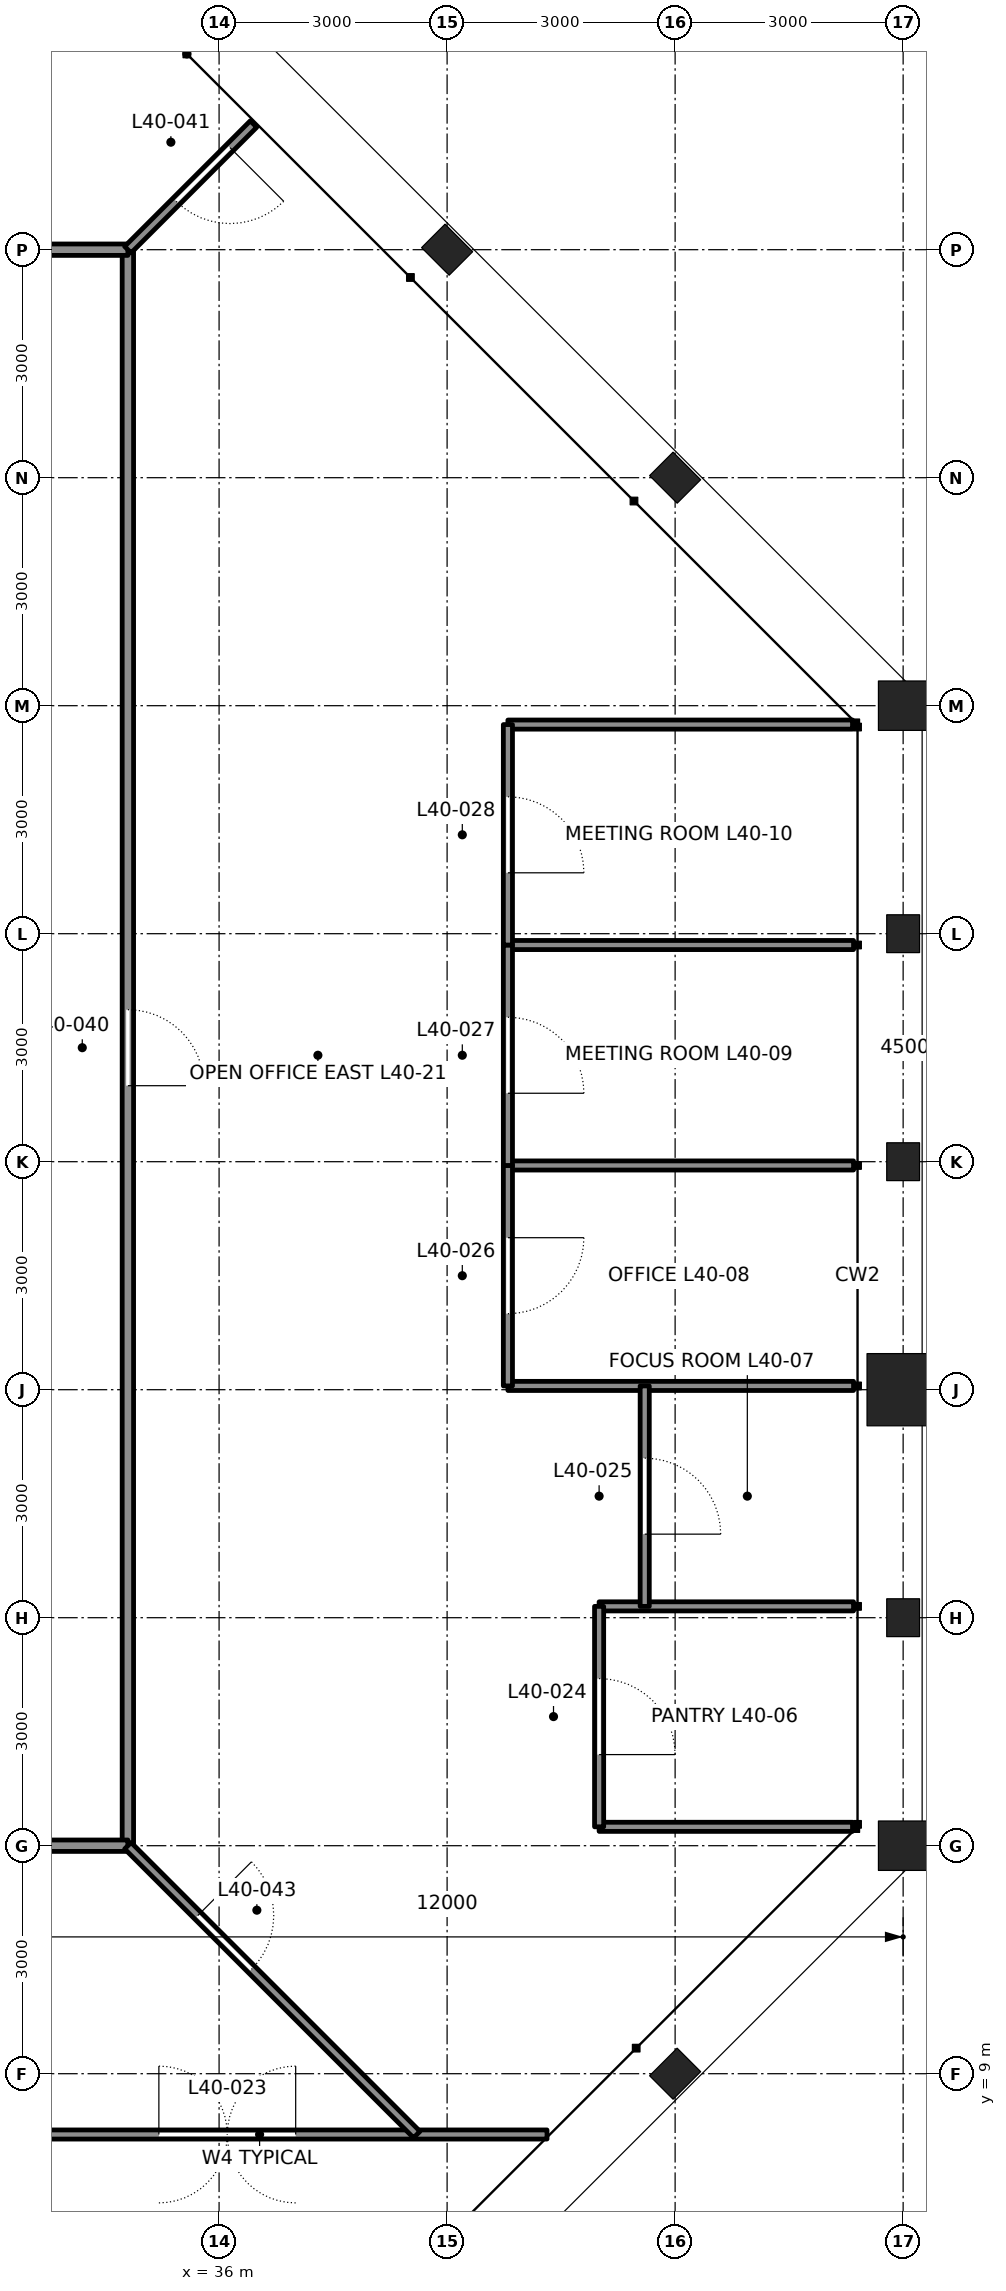
"""IFC4 building model, lengths in metres.
Left out: names, types, materials, properties, quantities, classifications, styles, units other than length and angle.
Written with IfcOpenShell. Run it as: python <this file> out.ifc"""

import sys

from ifc_helpers import new_model, si_unit, direction, frame, frame_2d, origin, origin_2d, place, context, subcontext, project, spatial, rectangle, hollow_rectangle, i_section, extrude, element, fill, save


model = new_model("IFC4")
c1 = context("Model", 3, precision=1e-05, world=origin(), true_north=direction((0.0, 1.0)))
c2 = subcontext(c1, "Body", "Model", "MODEL_VIEW")
j1 = project(units=[si_unit("LENGTHUNIT", "METRE"), si_unit("PLANEANGLEUNIT", "RADIAN")], contexts=[c1])
p1 = place(None, origin())
s1 = spatial("IfcSite", under=j1, at=p1, CompositionType="ELEMENT")
p2 = place(p1, origin())
s2 = spatial("IfcBuilding", under=s1, at=p2, CompositionType="ELEMENT")
p3 = place(p2, frame((0.0, 0.0, 184.5)))
s3 = spatial("IfcBuildingStorey", under=s2, at=p3, CompositionType="ELEMENT", Elevation=184.5)
p4 = place(p3, frame((42.0, 9.0, 0.0), z_axis=(0.0, 0.0, 1.0), x_axis=(0.707106781187, -0.707106781187, 0.0)))
e1 = element("IfcColumn", 1, at=p4, inside=s3, PredefinedType="COLUMN", context=c2, shape_type="SweptSolid", body=[
    extrude(i_section(OverallWidth=0.437, OverallDepth=0.513, WebThickness=0.061, FlangeThickness=0.097, at=origin_2d()), origin(), (0.0, 0.0, 1.0), 4.2),
])
p5 = place(p3, frame((45.0, 12.0, 0.0), z_axis=(0.0, 0.0, 1.0), x_axis=(1.0, 0.0, 0.0)))
e2 = element("IfcColumn", 2, at=p5, inside=s3, PredefinedType="COLUMN", context=c2, shape_type="SweptSolid", body=[
    extrude(hollow_rectangle(XDim=0.65, YDim=0.65, WallThickness=0.065, at=origin_2d()), origin(), (0.0, 0.0, 1.0), 4.2),
])
p6 = place(p3, frame((45.0, 15.0, 0.0), z_axis=(0.0, 0.0, 1.0), x_axis=(1.0, 0.0, 0.0)))
e3 = element("IfcColumn", 3, at=p6, inside=s3, PredefinedType="COLUMN", context=c2, shape_type="SweptSolid", body=[
    extrude(i_section(OverallWidth=0.432, OverallDepth=0.498, WebThickness=0.056, FlangeThickness=0.089, at=origin_2d()), origin(), (0.0, 0.0, 1.0), 4.2),
])
p7 = place(p3, frame((45.0, 18.0, 0.0), z_axis=(0.0, 0.0, 1.0), x_axis=(1.0, 0.0, 0.0)))
e4 = element("IfcColumn", 4, at=p7, inside=s3, PredefinedType="COLUMN", context=c2, shape_type="SweptSolid", body=[
    extrude(hollow_rectangle(XDim=0.95, YDim=0.95, WallThickness=0.11, at=origin_2d()), origin(), (0.0, 0.0, 1.0), 4.2),
])
for number, where, z_axis, x_axis in (
    (5, (45.0, 21.0, 0.0), (0.0, 0.0, 1.0), (1.0, 0.0, 0.0)),
    (6, (45.0, 24.0, 0.0), (0.0, 0.0, 1.0), (1.0, 0.0, 0.0)),
):
    element("IfcColumn", number, at=place(p3, frame(where, z_axis=z_axis, x_axis=x_axis)), inside=s3, PredefinedType="COLUMN", context=c2, shape_type="SweptSolid", body=[
        extrude(i_section(OverallWidth=0.432, OverallDepth=0.498, WebThickness=0.056, FlangeThickness=0.089, at=origin_2d()), origin(), (0.0, 0.0, 1.0), 4.2),
    ])
p8 = place(p3, frame((45.0, 27.0, 0.0), z_axis=(0.0, 0.0, 1.0), x_axis=(1.0, 0.0, 0.0)))
e7 = element("IfcColumn", 7, at=p8, inside=s3, PredefinedType="COLUMN", context=c2, shape_type="SweptSolid", body=[
    extrude(hollow_rectangle(XDim=0.65, YDim=0.65, WallThickness=0.065, at=origin_2d()), origin(), (0.0, 0.0, 1.0), 4.2),
])
for number, where, z_axis, x_axis in (
    (8, (42.0, 30.0, 0.0), (0.0, 0.0, 1.0), (0.707, 0.707, 0.0)),
    (9, (39.0, 33.0, 0.0), (0.0, 0.0, 1.0), (0.707, 0.707, 0.0)),
):
    element("IfcColumn", number, at=place(p3, frame(where, z_axis=z_axis, x_axis=x_axis)), inside=s3, PredefinedType="COLUMN", context=c2, shape_type="SweptSolid", body=[
        extrude(i_section(OverallWidth=0.437, OverallDepth=0.513, WebThickness=0.061, FlangeThickness=0.097, at=origin_2d()), origin(), (0.0, 0.0, 1.0), 4.2),
    ])
p9 = place(p3, frame((32.751, 8.2, 0.0), z_axis=(0.0, 0.0, 1.0), x_axis=(1.0, 0.0, 0.0)))
e10 = element("IfcWall", 10, at=p9, inside=s3, PredefinedType="PARTITIONING", context=c2, shape_type="SweptSolid", body=[
    extrude(rectangle(XDim=7.563, YDim=0.12, at=frame_2d((3.781, 0.0))), origin(), (0.0, 0.0, 1.0), 4.04),
])
p10 = place(p9, frame((2.456, 0.0, 0.0)))
e11 = element("IfcOpeningElement", 11, at=p10, cuts=e10, PredefinedType="OPENING", context=c2, shape_type="SweptSolid", body=[
    extrude(rectangle(XDim=1.8, YDim=2.4, at=frame_2d((0.9, 1.2))), frame((0.0, 0.07, 0.0), z_axis=(0.0, -1.0, 0.0), x_axis=(1.0, 0.0, 0.0)), (0.0, 0.0, 1.0), 0.14),
])
p11 = place(p3, frame((44.334, 12.249, 0.0), z_axis=(0.0, 0.0, 1.0), x_axis=(-1.0, 0.0, 0.0)))
e12 = element("IfcWall", 12, at=p11, inside=s3, PredefinedType="PARTITIONING", context=c2, shape_type="SweptSolid", body=[
    extrude(rectangle(XDim=3.334, YDim=0.12, at=frame_2d((1.667, 0.0))), origin(), (0.0, 0.0, 1.0), 4.04),
])
p12 = place(p3, frame((44.347, 15.149, 0.0), z_axis=(0.0, 0.0, 1.0), x_axis=(-1.0, 0.0, 0.0)))
e13 = element("IfcWall", 13, at=p12, inside=s3, PredefinedType="PARTITIONING", context=c2, shape_type="SweptSolid", body=[
    extrude(rectangle(XDim=3.347, YDim=0.12, at=frame_2d((1.674, 0.0))), origin(), (0.0, 0.0, 1.0), 4.04),
])
for number, where, z_axis, x_axis in (
    (14, (44.347, 18.05, 0.0), (0.0, 0.0, 1.0), (-1.0, 0.0, 0.0)),
    (15, (44.347, 20.95, 0.0), (0.0, 0.0, 1.0), (-1.0, 0.0, 0.0)),
):
    element("IfcWall", number, at=place(p3, frame(where, z_axis=z_axis, x_axis=x_axis)), inside=s3, PredefinedType="PARTITIONING", context=c2, shape_type="SweptSolid", body=[
        extrude(rectangle(XDim=4.547, YDim=0.12, at=frame_2d((2.274, 0.0))), origin(), (0.0, 0.0, 1.0), 3.357),
    ])
p13 = place(p3, frame((44.347, 23.851, 0.0), z_axis=(0.0, 0.0, 1.0), x_axis=(-1.0, 0.0, 0.0)))
e16 = element("IfcWall", 16, at=p13, inside=s3, PredefinedType="PARTITIONING", context=c2, shape_type="SweptSolid", body=[
    extrude(rectangle(XDim=4.547, YDim=0.12, at=frame_2d((2.274, 0.0))), origin(), (0.0, 0.0, 1.0), 4.04),
])
p14 = place(p3, frame((44.334, 26.751, 0.0), z_axis=(0.0, 0.0, 1.0), x_axis=(-1.0, 0.0, 0.0)))
e17 = element("IfcWall", 17, at=p14, inside=s3, PredefinedType="PARTITIONING", context=c2, shape_type="SweptSolid", body=[
    extrude(rectangle(XDim=4.534, YDim=0.12, at=frame_2d((2.267, 0.0))), origin(), (0.0, 0.0, 1.0), 4.04),
])
p15 = place(p3, frame((41.0, 12.249, 0.0), z_axis=(0.0, 0.0, 1.0), x_axis=(0.0, 1.0, 0.0)))
e18 = element("IfcWall", 18, at=p15, inside=s3, PredefinedType="PARTITIONING", context=c2, shape_type="SweptSolid", body=[
    extrude(rectangle(XDim=2.901, YDim=0.12, at=frame_2d((1.45, 0.0))), origin(), (0.0, 0.0, 1.0), 4.04),
])
p16 = place(p15, frame((0.95, 0.0, 0.0)))
e19 = element("IfcOpeningElement", 19, at=p16, cuts=e18, PredefinedType="OPENING", context=c2, shape_type="SweptSolid", body=[
    extrude(rectangle(XDim=1.0, YDim=2.4, at=frame_2d((0.5, 1.2))), frame((0.0, 0.07, 0.0), z_axis=(0.0, -1.0, 0.0), x_axis=(1.0, 0.0, 0.0)), (0.0, 0.0, 1.0), 0.14),
])
p17 = place(p3, frame((41.6, 15.149, 0.0), z_axis=(0.0, 0.0, 1.0), x_axis=(0.0, 1.0, 0.0)))
e20 = element("IfcWall", 20, at=p17, inside=s3, PredefinedType="PARTITIONING", context=c2, shape_type="SweptSolid", body=[
    extrude(rectangle(XDim=2.901, YDim=0.12, at=frame_2d((1.45, 0.0))), origin(), (0.0, 0.0, 1.0), 4.04),
])
p18 = place(p17, frame((0.95, 0.0, 0.0)))
e21 = element("IfcOpeningElement", 21, at=p18, cuts=e20, PredefinedType="OPENING", context=c2, shape_type="SweptSolid", body=[
    extrude(rectangle(XDim=1.0, YDim=2.4, at=frame_2d((0.5, 1.2))), frame((0.0, 0.07, 0.0), z_axis=(0.0, -1.0, 0.0), x_axis=(1.0, 0.0, 0.0)), (0.0, 0.0, 1.0), 0.14),
])
p19 = place(p3, frame((39.8, 18.05, 0.0), z_axis=(0.0, 0.0, 1.0), x_axis=(0.0, 1.0, 0.0)))
e22 = element("IfcWall", 22, at=p19, inside=s3, PredefinedType="PARTITIONING", context=c2, shape_type="SweptSolid", body=[
    extrude(rectangle(XDim=2.9, YDim=0.12, at=frame_2d((1.45, 0.0))), origin(), (0.0, 0.0, 1.0), 4.04),
])
p20 = place(p19, frame((0.95, 0.0, 0.0)))
e23 = element("IfcOpeningElement", 23, at=p20, cuts=e22, PredefinedType="OPENING", context=c2, shape_type="SweptSolid", body=[
    extrude(rectangle(XDim=1.0, YDim=2.4, at=frame_2d((0.5, 1.2))), frame((0.0, 0.07, 0.0), z_axis=(0.0, -1.0, 0.0), x_axis=(1.0, 0.0, 0.0)), (0.0, 0.0, 1.0), 0.14),
])
p21 = place(p3, frame((39.8, 20.95, 0.0), z_axis=(0.0, 0.0, 1.0), x_axis=(0.0, 1.0, 0.0)))
e24 = element("IfcWall", 24, at=p21, inside=s3, PredefinedType="PARTITIONING", context=c2, shape_type="SweptSolid", body=[
    extrude(rectangle(XDim=2.901, YDim=0.12, at=frame_2d((1.45, 0.0))), origin(), (0.0, 0.0, 1.0), 4.04),
])
p22 = place(p21, frame((0.95, 0.0, 0.0)))
e25 = element("IfcOpeningElement", 25, at=p22, cuts=e24, PredefinedType="OPENING", context=c2, shape_type="SweptSolid", body=[
    extrude(rectangle(XDim=1.0, YDim=2.4, at=frame_2d((0.5, 1.2))), frame((0.0, 0.07, 0.0), z_axis=(0.0, -1.0, 0.0), x_axis=(1.0, 0.0, 0.0)), (0.0, 0.0, 1.0), 0.14),
])
p23 = place(p3, frame((39.8, 23.851, 0.0), z_axis=(0.0, 0.0, 1.0), x_axis=(0.0, 1.0, 0.0)))
e26 = element("IfcWall", 26, at=p23, inside=s3, PredefinedType="PARTITIONING", context=c2, shape_type="SweptSolid", body=[
    extrude(rectangle(XDim=2.901, YDim=0.12, at=frame_2d((1.45, 0.0))), origin(), (0.0, 0.0, 1.0), 4.04),
])
p24 = place(p23, frame((0.95, 0.0, 0.0)))
e27 = element("IfcOpeningElement", 27, at=p24, cuts=e26, PredefinedType="OPENING", context=c2, shape_type="SweptSolid", body=[
    extrude(rectangle(XDim=1.0, YDim=2.4, at=frame_2d((0.5, 1.2))), frame((0.0, 0.07, 0.0), z_axis=(0.0, -1.0, 0.0), x_axis=(1.0, 0.0, 0.0)), (0.0, 0.0, 1.0), 0.14),
])
p25 = place(p3, frame((34.8, 12.0, 0.0), z_axis=(0.0, 0.0, 1.0), x_axis=(0.0, 1.0, 0.0)))
e28 = element("IfcWall", 28, at=p25, inside=s3, PredefinedType="PARTITIONING", context=c2, shape_type="SweptSolid", body=[
    extrude(rectangle(XDim=21.0, YDim=0.15, at=frame_2d((10.5, 0.0))), origin(), (0.0, 0.0, 1.0), 4.04),
])
p26 = place(p25, frame((10.0, 0.0, 0.0)))
e29 = element("IfcOpeningElement", 29, at=p26, cuts=e28, PredefinedType="OPENING", context=c2, shape_type="SweptSolid", body=[
    extrude(rectangle(XDim=1.0, YDim=2.4, at=frame_2d((0.5, 1.2))), frame((0.0, 0.085, 0.0), z_axis=(0.0, -1.0, 0.0), x_axis=(1.0, 0.0, 0.0)), (0.0, 0.0, 1.0), 0.17),
])
for number, where, z_axis, x_axis in (
    (30, (33.0, 33.0, 0.0), (0.0, 0.0, 1.0), (1.0, 0.0, 0.0)),
    (31, (33.0, 12.0, 0.0), (0.0, 0.0, 1.0), (1.0, 0.0, 0.0)),
):
    element("IfcWall", number, at=place(p3, frame(where, z_axis=z_axis, x_axis=x_axis)), inside=s3, PredefinedType="PARTITIONING", context=c2, shape_type="SweptSolid", body=[
        extrude(rectangle(XDim=1.8, YDim=0.15, at=frame_2d((0.9, 0.0))), origin(), (0.0, 0.0, 1.0), 3.271),
    ])
p27 = place(p3, frame((34.8, 33.0, 0.0), z_axis=(0.0, 0.0, 1.0), x_axis=(0.707106781187, 0.707106781187, 0.0)))
e32 = element("IfcWall", 32, at=p27, inside=s3, PredefinedType="PARTITIONING", context=c2, shape_type="SweptSolid", body=[
    extrude(rectangle(XDim=2.338, YDim=0.12, at=frame_2d((1.169, 0.0))), origin(), (0.0, 0.0, 1.0), 4.04),
])
p28 = place(p27, frame((0.9, 0.0, 0.0)))
e33 = element("IfcOpeningElement", 33, at=p28, cuts=e32, PredefinedType="OPENING", context=c2, shape_type="SweptSolid", body=[
    extrude(rectangle(XDim=1.0, YDim=2.4, at=frame_2d((0.5, 1.2))), frame((0.0, 0.07, 0.0), z_axis=(0.0, -1.0, 0.0), x_axis=(1.0, 0.0, 0.0)), (0.0, 0.0, 1.0), 0.14),
])
p29 = place(p3, frame((34.8, 12.0, 0.0), z_axis=(0.0, 0.0, 1.0), x_axis=(0.707106781187, -0.707106781187, 0.0)))
e34 = element("IfcWall", 34, at=p29, inside=s3, PredefinedType="PARTITIONING", context=c2, shape_type="SweptSolid", body=[
    extrude(rectangle(XDim=5.375, YDim=0.12, at=frame_2d((2.688, 0.0))), origin(), (0.0, 0.0, 1.0), 4.04),
])
p30 = place(p29, frame((1.3, 0.0, 0.0)))
e35 = element("IfcOpeningElement", 35, at=p30, cuts=e34, PredefinedType="OPENING", context=c2, shape_type="SweptSolid", body=[
    extrude(rectangle(XDim=1.0, YDim=2.4, at=frame_2d((0.5, 1.2))), frame((0.0, 0.07, 0.0), z_axis=(0.0, -1.0, 0.0), x_axis=(1.0, 0.0, 0.0)), (0.0, 0.0, 1.0), 0.14),
])
p31 = place(p10, origin())
e36 = element("IfcDoor", 36, at=p31, inside=s3, OperationType="DOUBLE_DOOR_DOUBLE_SWING", PredefinedType="DOOR", context=c2, shape_type="SweptSolid", body=[
    extrude(rectangle(XDim=1.8, YDim=2.4, at=frame_2d((0.9, 1.2))), frame((0.0, 0.025, 0.0), z_axis=(0.0, -1.0, 0.0), x_axis=(1.0, 0.0, 0.0)), (0.0, 0.0, 1.0), 0.05),
])
fill(e11, e36)
p32 = place(p16, frame((1.0, 0.0, 0.0), z_axis=(0.0, 0.0, 1.0), x_axis=(-1.0, 0.0, 0.0)))
e37 = element("IfcDoor", 37, at=p32, inside=s3, OperationType="SINGLE_SWING_RIGHT", PredefinedType="DOOR", context=c2, shape_type="SweptSolid", body=[
    extrude(rectangle(XDim=1.0, YDim=2.4, at=frame_2d((0.5, 1.2))), frame((0.0, 0.025, 0.0), z_axis=(0.0, -1.0, 0.0), x_axis=(1.0, 0.0, 0.0)), (0.0, 0.0, 1.0), 0.05),
])
fill(e19, e37)
p33 = place(p18, frame((1.0, 0.0, 0.0), z_axis=(0.0, 0.0, 1.0), x_axis=(-1.0, 0.0, 0.0)))
e38 = element("IfcDoor", 38, at=p33, inside=s3, OperationType="SINGLE_SWING_RIGHT", PredefinedType="DOOR", context=c2, shape_type="SweptSolid", body=[
    extrude(rectangle(XDim=1.0, YDim=2.4, at=frame_2d((0.5, 1.2))), frame((0.0, 0.025, 0.0), z_axis=(0.0, -1.0, 0.0), x_axis=(1.0, 0.0, 0.0)), (0.0, 0.0, 1.0), 0.05),
])
fill(e21, e38)
p34 = place(p20, frame((1.0, 0.0, 0.0), z_axis=(0.0, 0.0, 1.0), x_axis=(-1.0, 0.0, 0.0)))
e39 = element("IfcDoor", 39, at=p34, inside=s3, OperationType="SINGLE_SWING_LEFT", PredefinedType="DOOR", context=c2, shape_type="SweptSolid", body=[
    extrude(rectangle(XDim=1.0, YDim=2.4, at=frame_2d((0.5, 1.2))), frame((0.0, 0.025, 0.0), z_axis=(0.0, -1.0, 0.0), x_axis=(1.0, 0.0, 0.0)), (0.0, 0.0, 1.0), 0.05),
])
fill(e23, e39)
p35 = place(p22, frame((1.0, 0.0, 0.0), z_axis=(0.0, 0.0, 1.0), x_axis=(-1.0, 0.0, 0.0)))
e40 = element("IfcDoor", 40, at=p35, inside=s3, OperationType="SINGLE_SWING_RIGHT", PredefinedType="DOOR", context=c2, shape_type="SweptSolid", body=[
    extrude(rectangle(XDim=1.0, YDim=2.4, at=frame_2d((0.5, 1.2))), frame((0.0, 0.025, 0.0), z_axis=(0.0, -1.0, 0.0), x_axis=(1.0, 0.0, 0.0)), (0.0, 0.0, 1.0), 0.05),
])
fill(e25, e40)
p36 = place(p24, frame((1.0, 0.0, 0.0), z_axis=(0.0, 0.0, 1.0), x_axis=(-1.0, 0.0, 0.0)))
e41 = element("IfcDoor", 41, at=p36, inside=s3, OperationType="SINGLE_SWING_RIGHT", PredefinedType="DOOR", context=c2, shape_type="SweptSolid", body=[
    extrude(rectangle(XDim=1.0, YDim=2.4, at=frame_2d((0.5, 1.2))), frame((0.0, 0.025, 0.0), z_axis=(0.0, -1.0, 0.0), x_axis=(1.0, 0.0, 0.0)), (0.0, 0.0, 1.0), 0.05),
])
fill(e27, e41)
p37 = place(p26, frame((1.0, 0.0, 0.0), z_axis=(0.0, 0.0, 1.0), x_axis=(-1.0, 0.0, 0.0)))
e42 = element("IfcDoor", 42, at=p37, inside=s3, OperationType="SINGLE_SWING_RIGHT", PredefinedType="DOOR", context=c2, shape_type="SweptSolid", body=[
    extrude(rectangle(XDim=1.0, YDim=2.4, at=frame_2d((0.5, 1.2))), frame((0.0, 0.025, 0.0), z_axis=(0.0, -1.0, 0.0), x_axis=(1.0, 0.0, 0.0)), (0.0, 0.0, 1.0), 0.05),
])
fill(e29, e42)
p38 = place(p28, frame((1.0, 0.0, 0.0), z_axis=(0.0, 0.0, 1.0), x_axis=(-1.0, 0.0, 0.0)))
e43 = element("IfcDoor", 43, at=p38, inside=s3, OperationType="SINGLE_SWING_LEFT", PredefinedType="DOOR", context=c2, shape_type="SweptSolid", body=[
    extrude(rectangle(XDim=1.0, YDim=2.4, at=frame_2d((0.5, 1.2))), frame((0.0, 0.025, 0.0), z_axis=(0.0, -1.0, 0.0), x_axis=(1.0, 0.0, 0.0)), (0.0, 0.0, 1.0), 0.05),
])
fill(e33, e43)
p39 = place(p30, origin())
e44 = element("IfcDoor", 44, at=p39, inside=s3, OperationType="SINGLE_SWING_LEFT", PredefinedType="DOOR", context=c2, shape_type="SweptSolid", body=[
    extrude(rectangle(XDim=1.0, YDim=2.4, at=frame_2d((0.5, 1.2))), frame((0.0, 0.025, 0.0), z_axis=(0.0, -1.0, 0.0), x_axis=(1.0, 0.0, 0.0)), (0.0, 0.0, 1.0), 0.05),
])
fill(e35, e44)
save(model, sys.argv[1])
